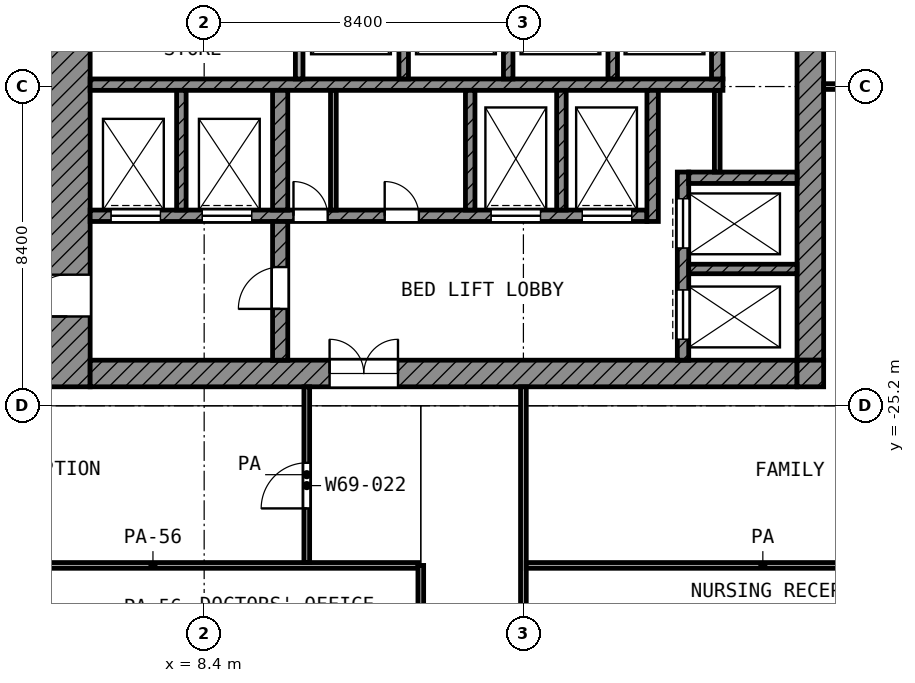
"""IFC4 building model, lengths in metres.
Left out: names, types, materials, properties, quantities, classifications, styles, units other than length and angle.
Written with IfcOpenShell. Run it as: python <this file> out.ifc"""

import sys

from ifc_helpers import new_model, si_unit, direction, frame, frame_2d, origin, place, context, subcontext, project, spatial, rectangle, extrude, element, fill, save


model = new_model("IFC4")
c1 = context("Model", 3, precision=1e-05, world=origin(), true_north=direction((0.0, 1.0)))
c2 = subcontext(c1, "Body", "Model", "MODEL_VIEW")
j1 = project(units=[si_unit("LENGTHUNIT", "METRE"), si_unit("PLANEANGLEUNIT", "RADIAN")], contexts=[c1])
p1 = place(None, origin())
s1 = spatial("IfcSite", under=j1, at=p1, CompositionType="ELEMENT")
p2 = place(p1, origin())
s2 = spatial("IfcBuilding", under=s1, at=p2, CompositionType="ELEMENT")
p3 = place(p2, frame((0.0, 0.0, 298.6)))
s3 = spatial("IfcBuildingStorey", under=s2, at=p3, CompositionType="ELEMENT", Elevation=298.6)
p4 = place(p3, frame((4.8, -24.7, 0.0), z_axis=(0.0, 0.0, 1.0), x_axis=(0.0, 1.0, 0.0)))
e1 = element("IfcWall", 1, at=p4, inside=s3, PredefinedType="SHEAR", context=c2, shape_type="SweptSolid", body=[
    extrude(rectangle(XDim=19.3, YDim=1.2, at=frame_2d((9.65, 0.0))), origin(), (0.0, 0.0, 1.0), 3.6),
])
p5 = place(p4, frame((11.15, 0.0, 0.0)))
e2 = element("IfcOpeningElement", 2, at=p5, cuts=e1, PredefinedType="OPENING", context=c2, shape_type="SweptSolid", body=[
    extrude(rectangle(XDim=1.1, YDim=2.1, at=frame_2d((0.55, 1.05))), frame((0.0, 0.61, 0.0), z_axis=(0.0, -1.0, 0.0), x_axis=(1.0, 0.0, 0.0)), (0.0, 0.0, 1.0), 1.22),
])
p6 = place(p4, frame((1.85, 0.0, 0.0)))
e3 = element("IfcOpeningElement", 3, at=p6, cuts=e1, PredefinedType="OPENING", context=c2, shape_type="SweptSolid", body=[
    extrude(rectangle(XDim=1.1, YDim=2.1, at=frame_2d((0.55, 1.05))), frame((0.0, 0.61, 0.0), z_axis=(0.0, -1.0, 0.0), x_axis=(1.0, 0.0, 0.0)), (0.0, 0.0, 1.0), 1.22),
])
p7 = place(p3, frame((24.35, -24.0, 0.0), z_axis=(0.0, 0.0, 1.0), x_axis=(0.0, 1.0, 0.0)))
e4 = element("IfcWall", 4, at=p7, inside=s3, PredefinedType="SHEAR", context=c2, shape_type="SweptSolid", body=[
    extrude(rectangle(XDim=18.6, YDim=0.7, at=frame_2d((9.3, 0.0))), origin(), (0.0, 0.0, 1.0), 3.6),
])
p8 = place(p7, frame((10.5, 0.0, 0.0)))
e5 = element("IfcOpeningElement", 5, at=p8, cuts=e4, PredefinedType="OPENING", context=c2, shape_type="SweptSolid", body=[
    extrude(rectangle(XDim=1.8, YDim=2.1, at=frame_2d((0.9, 1.05))), frame((0.0, 0.36, 0.0), z_axis=(0.0, -1.0, 0.0), x_axis=(1.0, 0.0, 0.0)), (0.0, 0.0, 1.0), 0.72),
])
p9 = place(p3, frame((5.4, -24.35, 0.0), z_axis=(0.0, 0.0, 1.0), x_axis=(1.0, 0.0, 0.0)))
e6 = element("IfcWall", 6, at=p9, inside=s3, PredefinedType="SHEAR", context=c2, shape_type="SweptSolid", body=[
    extrude(rectangle(XDim=18.6, YDim=0.7, at=frame_2d((9.3, 0.0))), origin(), (0.0, 0.0, 1.0), 3.6),
])
p10 = place(p9, frame((6.3, 0.0, 0.0)))
e7 = element("IfcOpeningElement", 7, at=p10, cuts=e6, PredefinedType="OPENING", context=c2, shape_type="SweptSolid", body=[
    extrude(rectangle(XDim=1.8, YDim=2.1, at=frame_2d((0.9, 1.05))), frame((0.0, 0.36, 0.0), z_axis=(0.0, -1.0, 0.0), x_axis=(1.0, 0.0, 0.0)), (0.0, 0.0, 1.0), 0.72),
])
p11 = place(p3, frame((24.35, -24.7, 0.0), z_axis=(0.0, 0.0, 1.0), x_axis=(0.0, 1.0, 0.0)))
e8 = element("IfcWall", 8, at=p11, inside=s3, PredefinedType="SHEAR", context=c2, shape_type="SweptSolid", body=[
    extrude(rectangle(XDim=0.7, YDim=0.7, at=frame_2d((0.35, 0.0))), origin(), (0.0, 0.0, 1.0), 3.6),
])
p12 = place(p3, frame((5.4, -16.75, 0.0), z_axis=(0.0, 0.0, 1.0), x_axis=(1.0, 0.0, 0.0)))
e9 = element("IfcWall", 9, at=p12, inside=s3, PredefinedType="SHEAR", context=c2, shape_type="SweptSolid", body=[
    extrude(rectangle(XDim=16.65, YDim=0.3, at=frame_2d((8.325, 0.0))), origin(), (0.0, 0.0, 1.0), 3.6),
])
p13 = place(p3, frame((5.4, -20.2, 0.0), z_axis=(0.0, 0.0, 1.0), x_axis=(1.0, 0.0, 0.0)))
e10 = element("IfcWall", 10, at=p13, inside=s3, PredefinedType="SHEAR", context=c2, shape_type="SweptSolid", body=[
    extrude(rectangle(XDim=14.65, YDim=0.3, at=frame_2d((7.325, 0.0))), origin(), (0.0, 0.0, 1.0), 3.6),
])
p14 = place(p13, frame((10.55, 0.0, 0.0)))
e11 = element("IfcOpeningElement", 11, at=p14, cuts=e10, PredefinedType="OPENING", context=c2, shape_type="SweptSolid", body=[
    extrude(rectangle(XDim=1.3, YDim=2.1, at=frame_2d((0.65, 1.05))), frame((0.0, 0.16, 0.0), z_axis=(0.0, -1.0, 0.0), x_axis=(1.0, 0.0, 0.0)), (0.0, 0.0, 1.0), 0.32),
])
p15 = place(p13, frame((12.95, 0.0, 0.0)))
e12 = element("IfcOpeningElement", 12, at=p15, cuts=e10, PredefinedType="OPENING", context=c2, shape_type="SweptSolid", body=[
    extrude(rectangle(XDim=1.3, YDim=2.1, at=frame_2d((0.65, 1.05))), frame((0.0, 0.16, 0.0), z_axis=(0.0, -1.0, 0.0), x_axis=(1.0, 0.0, 0.0)), (0.0, 0.0, 1.0), 0.32),
])
p16 = place(p13, frame((0.55, 0.0, 0.0)))
e13 = element("IfcOpeningElement", 13, at=p16, cuts=e10, PredefinedType="OPENING", context=c2, shape_type="SweptSolid", body=[
    extrude(rectangle(XDim=1.3, YDim=2.1, at=frame_2d((0.65, 1.05))), frame((0.0, 0.16, 0.0), z_axis=(0.0, -1.0, 0.0), x_axis=(1.0, 0.0, 0.0)), (0.0, 0.0, 1.0), 0.32),
])
p17 = place(p13, frame((2.95, 0.0, 0.0)))
e14 = element("IfcOpeningElement", 14, at=p17, cuts=e10, PredefinedType="OPENING", context=c2, shape_type="SweptSolid", body=[
    extrude(rectangle(XDim=1.3, YDim=2.1, at=frame_2d((0.65, 1.05))), frame((0.0, 0.16, 0.0), z_axis=(0.0, -1.0, 0.0), x_axis=(1.0, 0.0, 0.0)), (0.0, 0.0, 1.0), 0.32),
])
p18 = place(p13, frame((5.35, 0.0, 0.0)))
e15 = element("IfcOpeningElement", 15, at=p18, cuts=e10, PredefinedType="OPENING", context=c2, shape_type="SweptSolid", body=[
    extrude(rectangle(XDim=0.9, YDim=2.1, at=frame_2d((0.45, 1.05))), frame((0.0, 0.16, 0.0), z_axis=(0.0, -1.0, 0.0), x_axis=(1.0, 0.0, 0.0)), (0.0, 0.0, 1.0), 0.32),
])
p19 = place(p13, frame((7.75, 0.0, 0.0)))
e16 = element("IfcOpeningElement", 16, at=p19, cuts=e10, PredefinedType="OPENING", context=c2, shape_type="SweptSolid", body=[
    extrude(rectangle(XDim=0.9, YDim=2.1, at=frame_2d((0.45, 1.05))), frame((0.0, 0.16, 0.0), z_axis=(0.0, -1.0, 0.0), x_axis=(1.0, 0.0, 0.0)), (0.0, 0.0, 1.0), 0.32),
])
p20 = place(p3, frame((10.4, -24.0, 0.0), z_axis=(0.0, 0.0, 1.0), x_axis=(0.0, 1.0, 0.0)))
e17 = element("IfcWall", 17, at=p20, inside=s3, PredefinedType="SHEAR", context=c2, shape_type="SweptSolid", body=[
    extrude(rectangle(XDim=3.65, YDim=0.4, at=frame_2d((1.825, 0.0))), origin(), (0.0, 0.0, 1.0), 3.6),
])
p21 = place(p20, frame((1.35, 0.0, 0.0)))
e18 = element("IfcOpeningElement", 18, at=p21, cuts=e17, PredefinedType="OPENING", context=c2, shape_type="SweptSolid", body=[
    extrude(rectangle(XDim=1.1, YDim=2.1, at=frame_2d((0.55, 1.05))), frame((0.0, 0.21, 0.0), z_axis=(0.0, -1.0, 0.0), x_axis=(1.0, 0.0, 0.0)), (0.0, 0.0, 1.0), 0.42),
])
p22 = place(p3, frame((10.4, -20.05, 0.0), z_axis=(0.0, 0.0, 1.0), x_axis=(0.0, 1.0, 0.0)))
e19 = element("IfcWall", 19, at=p22, inside=s3, PredefinedType="SHEAR", context=c2, shape_type="SweptSolid", body=[
    extrude(rectangle(XDim=3.15, YDim=0.4, at=frame_2d((1.575, 0.0))), origin(), (0.0, 0.0, 1.0), 3.6),
])
p23 = place(p3, frame((20.2, -20.35, 0.0), z_axis=(0.0, 0.0, 1.0), x_axis=(0.0, 1.0, 0.0)))
e20 = element("IfcWall", 20, at=p23, inside=s3, PredefinedType="SHEAR", context=c2, shape_type="SweptSolid", body=[
    extrude(rectangle(XDim=3.45, YDim=0.3, at=frame_2d((1.725, 0.0))), origin(), (0.0, 0.0, 1.0), 3.6),
])
p24 = place(p3, frame((21.9, -16.6, 0.0), z_axis=(0.0, 0.0, 1.0), x_axis=(0.0, 1.0, 0.0)))
e21 = element("IfcWall", 21, at=p24, inside=s3, PredefinedType="SHEAR", context=c2, shape_type="SweptSolid", body=[
    extrude(rectangle(XDim=2.35, YDim=0.3, at=frame_2d((1.175, 0.0))), origin(), (0.0, 0.0, 1.0), 3.6),
])
p25 = place(p3, frame((21.15, -19.2, 0.0), z_axis=(0.0, 0.0, 1.0), x_axis=(1.0, 0.0, 0.0)))
e22 = element("IfcWall", 22, at=p25, inside=s3, PredefinedType="SHEAR", context=c2, shape_type="SweptSolid", body=[
    extrude(rectangle(XDim=2.85, YDim=0.3, at=frame_2d((1.425, 0.0))), origin(), (0.0, 0.0, 1.0), 3.6),
])
p26 = place(p3, frame((21.0, -24.0, 0.0), z_axis=(0.0, 0.0, 1.0), x_axis=(0.0, 1.0, 0.0)))
e23 = element("IfcWall", 23, at=p26, inside=s3, PredefinedType="SHEAR", context=c2, shape_type="SweptSolid", body=[
    extrude(rectangle(XDim=4.95, YDim=0.3, at=frame_2d((2.475, 0.0))), origin(), (0.0, 0.0, 1.0), 3.6),
])
p27 = place(p26, frame((2.95, 0.0, 0.0)))
e24 = element("IfcOpeningElement", 24, at=p27, cuts=e23, PredefinedType="OPENING", context=c2, shape_type="SweptSolid", body=[
    extrude(rectangle(XDim=1.3, YDim=2.1, at=frame_2d((0.65, 1.05))), frame((0.0, 0.16, 0.0), z_axis=(0.0, -1.0, 0.0), x_axis=(1.0, 0.0, 0.0)), (0.0, 0.0, 1.0), 0.32),
])
p28 = place(p26, frame((0.55, 0.0, 0.0)))
e25 = element("IfcOpeningElement", 25, at=p28, cuts=e23, PredefinedType="OPENING", context=c2, shape_type="SweptSolid", body=[
    extrude(rectangle(XDim=1.3, YDim=2.1, at=frame_2d((0.65, 1.05))), frame((0.0, 0.16, 0.0), z_axis=(0.0, -1.0, 0.0), x_axis=(1.0, 0.0, 0.0)), (0.0, 0.0, 1.0), 0.32),
])
p29 = place(p3, frame((21.15, -21.6, 0.0), z_axis=(0.0, 0.0, 1.0), x_axis=(1.0, 0.0, 0.0)))
e26 = element("IfcWall", 26, at=p29, inside=s3, PredefinedType="SHEAR", context=c2, shape_type="SweptSolid", body=[
    extrude(rectangle(XDim=2.85, YDim=0.25, at=frame_2d((1.425, 0.0))), origin(), (0.0, 0.0, 1.0), 3.6),
])
for number, where, z_axis, x_axis in (
    (27, (7.8, -20.05, 0.0), (0.0, 0.0, 1.0), (0.0, 1.0, 0.0)),
    (28, (15.4, -20.05, 0.0), (0.0, 0.0, 1.0), (0.0, 1.0, 0.0)),
    (29, (17.8, -20.05, 0.0), (0.0, 0.0, 1.0), (0.0, 1.0, 0.0)),
):
    element("IfcWall", number, at=place(p3, frame(where, z_axis=z_axis, x_axis=x_axis)), inside=s3, PredefinedType="SHEAR", context=c2, shape_type="SweptSolid", body=[
        extrude(rectangle(XDim=3.15, YDim=0.25, at=frame_2d((1.575, 0.0))), origin(), (0.0, 0.0, 1.0), 3.6),
    ])
p30 = place(p3, frame((10.9, -16.6, 0.0), z_axis=(0.0, 0.0, 1.0), x_axis=(0.0, 1.0, 0.0)))
e30 = element("IfcWall", 30, at=p30, inside=s3, PredefinedType="PARTITIONING", context=c2, shape_type="SweptSolid", body=[
    extrude(rectangle(XDim=2.35, YDim=0.2, at=frame_2d((1.175, 0.0))), origin(), (0.0, 0.0, 1.0), 3.6),
])
for number, where, z_axis, x_axis in (
    (31, (13.65, -16.6, 0.0), (0.0, 0.0, 1.0), (0.0, 1.0, 0.0)),
    (32, (16.4, -16.6, 0.0), (0.0, 0.0, 1.0), (0.0, 1.0, 0.0)),
    (33, (19.15, -16.6, 0.0), (0.0, 0.0, 1.0), (0.0, 1.0, 0.0)),
):
    element("IfcWall", number, at=place(p3, frame(where, z_axis=z_axis, x_axis=x_axis)), inside=s3, PredefinedType="SHEAR", context=c2, shape_type="SweptSolid", body=[
        extrude(rectangle(XDim=2.35, YDim=0.25, at=frame_2d((1.175, 0.0))), origin(), (0.0, 0.0, 1.0), 3.6),
    ])
p31 = place(p3, frame((21.9, -19.05, 0.0), z_axis=(0.0, 0.0, 1.0), x_axis=(0.0, 1.0, 0.0)))
e34 = element("IfcWall", 34, at=p31, inside=s3, PredefinedType="PARTITIONING", context=c2, shape_type="SweptSolid", body=[
    extrude(rectangle(XDim=2.15, YDim=0.15, at=frame_2d((1.075, 0.0))), origin(), (0.0, 0.0, 1.0), 3.6),
])
p32 = place(p3, frame((11.8, -20.05, 0.0), z_axis=(0.0, 0.0, 1.0), x_axis=(0.0, 1.0, 0.0)))
e35 = element("IfcWall", 35, at=p32, inside=s3, PredefinedType="PARTITIONING", context=c2, shape_type="SweptSolid", body=[
    extrude(rectangle(XDim=3.15, YDim=0.15, at=frame_2d((1.575, 0.0))), origin(), (0.0, 0.0, 1.0), 3.6),
])
p33 = place(p3, frame((0.08, -29.4, 0.0), z_axis=(0.0, 0.0, 1.0), x_axis=(1.0, 0.0, 0.0)))
e36 = element("IfcWall", 36, at=p33, inside=s3, PredefinedType="PARTITIONING", context=c2, shape_type="SweptSolid", body=[
    extrude(rectangle(XDim=13.945, YDim=0.15, at=frame_2d((6.972, 0.0))), origin(), (0.0, 0.0, 1.0), 2.7),
])
p34 = place(p3, frame((16.875, -29.4, 0.0), z_axis=(0.0, 0.0, 1.0), x_axis=(1.0, 0.0, 0.0)))
e37 = element("IfcWall", 37, at=p34, inside=s3, PredefinedType="PARTITIONING", context=c2, shape_type="SweptSolid", body=[
    extrude(rectangle(XDim=12.45, YDim=0.15, at=frame_2d((6.225, 0.0))), origin(), (0.0, 0.0, 1.0), 3.6),
])
p35 = place(p3, frame((24.7, -16.8, 0.0), z_axis=(0.0, 0.0, 1.0), x_axis=(1.0, 0.0, 0.0)))
e38 = element("IfcWall", 38, at=p35, inside=s3, PredefinedType="PARTITIONING", context=c2, shape_type="SweptSolid", body=[
    extrude(rectangle(XDim=34.02, YDim=0.15, at=frame_2d((17.01, 0.0))), origin(), (0.0, 0.0, 1.0), 3.6),
])
p36 = place(p35, frame((1.85, 0.0, 0.0)))
e39 = element("IfcOpeningElement", 39, at=p36, cuts=e38, PredefinedType="OPENING", context=c2, shape_type="SweptSolid", body=[
    extrude(rectangle(XDim=1.5, YDim=2.1, at=frame_2d((0.75, 1.05))), frame((0.0, 0.085, 0.0), z_axis=(0.0, -1.0, 0.0), x_axis=(1.0, 0.0, 0.0)), (0.0, 0.0, 1.0), 0.17),
])
p37 = place(p35, frame((6.2, 0.0, 0.0)))
e40 = element("IfcOpeningElement", 40, at=p37, cuts=e38, PredefinedType="OPENING", context=c2, shape_type="SweptSolid", body=[
    extrude(rectangle(XDim=1.2, YDim=2.1, at=frame_2d((0.6, 1.05))), frame((0.0, 0.085, 0.0), z_axis=(0.0, -1.0, 0.0), x_axis=(1.0, 0.0, 0.0)), (0.0, 0.0, 1.0), 0.17),
])
p38 = place(p35, frame((10.35, 0.0, 0.0)))
e41 = element("IfcOpeningElement", 41, at=p38, cuts=e38, PredefinedType="OPENING", context=c2, shape_type="SweptSolid", body=[
    extrude(rectangle(XDim=1.0, YDim=2.1, at=frame_2d((0.5, 1.05))), frame((0.0, 0.085, 0.0), z_axis=(0.0, -1.0, 0.0), x_axis=(1.0, 0.0, 0.0)), (0.0, 0.0, 1.0), 0.17),
])
p39 = place(p35, frame((20.0, 0.0, 0.0)))
e42 = element("IfcOpeningElement", 42, at=p39, cuts=e38, PredefinedType="OPENING", context=c2, shape_type="SweptSolid", body=[
    extrude(rectangle(XDim=1.2, YDim=2.1, at=frame_2d((0.6, 1.05))), frame((0.0, 0.085, 0.0), z_axis=(0.0, -1.0, 0.0), x_axis=(1.0, 0.0, 0.0)), (0.0, 0.0, 1.0), 0.17),
])
p40 = place(p35, frame((18.4, 0.0, 0.0)))
e43 = element("IfcOpeningElement", 43, at=p40, cuts=e38, PredefinedType="OPENING", context=c2, shape_type="SweptSolid", body=[
    extrude(rectangle(XDim=1.2, YDim=2.1, at=frame_2d((0.6, 1.05))), frame((0.0, 0.085, 0.0), z_axis=(0.0, -1.0, 0.0), x_axis=(1.0, 0.0, 0.0)), (0.0, 0.0, 1.0), 0.17),
])
p41 = place(p35, frame((23.1, 0.0, 0.0)))
e44 = element("IfcOpeningElement", 44, at=p41, cuts=e38, PredefinedType="OPENING", context=c2, shape_type="SweptSolid", body=[
    extrude(rectangle(XDim=1.0, YDim=2.1, at=frame_2d((0.5, 1.05))), frame((0.0, 0.085, 0.0), z_axis=(0.0, -1.0, 0.0), x_axis=(1.0, 0.0, 0.0)), (0.0, 0.0, 1.0), 0.17),
])
p42 = place(p35, frame((29.15, 0.0, 0.0)))
e45 = element("IfcOpeningElement", 45, at=p42, cuts=e38, PredefinedType="OPENING", context=c2, shape_type="SweptSolid", body=[
    extrude(rectangle(XDim=1.5, YDim=2.1, at=frame_2d((0.75, 1.05))), frame((0.0, 0.085, 0.0), z_axis=(0.0, -1.0, 0.0), x_axis=(1.0, 0.0, 0.0)), (0.0, 0.0, 1.0), 0.17),
])
p43 = place(p3, frame((11.1, -29.325, 0.0), z_axis=(0.0, 0.0, 1.0), x_axis=(0.0, 1.0, 0.0)))
e46 = element("IfcWall", 46, at=p43, inside=s3, PredefinedType="PARTITIONING", context=c2, shape_type="SweptSolid", body=[
    extrude(rectangle(XDim=4.625, YDim=0.15, at=frame_2d((2.312, 0.0))), origin(), (0.0, 0.0, 1.0), 3.6),
])
p44 = place(p43, frame((1.425, 0.0, 0.0)))
e47 = element("IfcOpeningElement", 47, at=p44, cuts=e46, PredefinedType="OPENING", context=c2, shape_type="SweptSolid", body=[
    extrude(rectangle(XDim=1.2, YDim=2.1, at=frame_2d((0.6, 1.05))), frame((0.0, 0.085, 0.0), z_axis=(0.0, -1.0, 0.0), x_axis=(1.0, 0.0, 0.0)), (0.0, 0.0, 1.0), 0.17),
])
p45 = place(p3, frame((14.1, -31.957, 0.0), z_axis=(0.0, 0.0, 1.0), x_axis=(0.0, 1.0, 0.0)))
e48 = element("IfcWall", 48, at=p45, inside=s3, PredefinedType="PARTITIONING", context=c2, shape_type="SweptSolid", body=[
    extrude(rectangle(XDim=2.557, YDim=0.15, at=frame_2d((1.279, 0.0))), origin(), (0.0, 0.0, 1.0), 3.6),
])
p46 = place(p3, frame((16.8, -41.92, 0.0), z_axis=(0.0, 0.0, 1.0), x_axis=(0.0, 1.0, 0.0)))
e49 = element("IfcWall", 49, at=p46, inside=s3, PredefinedType="PARTITIONING", context=c2, shape_type="SweptSolid", body=[
    extrude(rectangle(XDim=17.22, YDim=0.15, at=frame_2d((8.61, 0.0))), origin(), (0.0, 0.0, 1.0), 3.6),
])
p47 = place(p46, frame((9.82, 0.0, 0.0)))
e50 = element("IfcOpeningElement", 50, at=p47, cuts=e49, PredefinedType="OPENING", context=c2, shape_type="SweptSolid", body=[
    extrude(rectangle(XDim=1.2, YDim=2.1, at=frame_2d((0.6, 1.05))), frame((0.0, 0.085, 0.0), z_axis=(0.0, -1.0, 0.0), x_axis=(1.0, 0.0, 0.0)), (0.0, 0.0, 1.0), 0.17),
])
p48 = place(p46, frame((5.87, 0.0, 0.0)))
e51 = element("IfcOpeningElement", 51, at=p48, cuts=e49, PredefinedType="OPENING", context=c2, shape_type="SweptSolid", body=[
    extrude(rectangle(XDim=1.0, YDim=2.1, at=frame_2d((0.5, 1.05))), frame((0.0, 0.085, 0.0), z_axis=(0.0, -1.0, 0.0), x_axis=(1.0, 0.0, 0.0)), (0.0, 0.0, 1.0), 0.17),
])
p49 = place(p46, frame((1.67, 0.0, 0.0)))
e52 = element("IfcOpeningElement", 52, at=p49, cuts=e49, PredefinedType="OPENING", context=c2, shape_type="SweptSolid", body=[
    extrude(rectangle(XDim=1.0, YDim=2.1, at=frame_2d((0.5, 1.05))), frame((0.0, 0.085, 0.0), z_axis=(0.0, -1.0, 0.0), x_axis=(1.0, 0.0, 0.0)), (0.0, 0.0, 1.0), 0.17),
])
p50 = place(p27, origin())
e53 = element("IfcDoor", 53, at=p50, inside=s3, OperationType="DOUBLE_DOOR_SLIDING", PredefinedType="DOOR", context=c2, shape_type="SweptSolid", body=[
    extrude(rectangle(XDim=1.3, YDim=2.1, at=frame_2d((0.65, 1.05))), frame((0.0, 0.025, 0.0), z_axis=(0.0, -1.0, 0.0), x_axis=(1.0, 0.0, 0.0)), (0.0, 0.0, 1.0), 0.05),
])
fill(e24, e53)
p51 = place(p28, origin())
e54 = element("IfcDoor", 54, at=p51, inside=s3, OperationType="DOUBLE_DOOR_SLIDING", PredefinedType="DOOR", context=c2, shape_type="SweptSolid", body=[
    extrude(rectangle(XDim=1.3, YDim=2.1, at=frame_2d((0.65, 1.05))), frame((0.0, 0.025, 0.0), z_axis=(0.0, -1.0, 0.0), x_axis=(1.0, 0.0, 0.0)), (0.0, 0.0, 1.0), 0.05),
])
fill(e25, e54)
p52 = place(p14, origin())
e55 = element("IfcDoor", 55, at=p52, inside=s3, OperationType="DOUBLE_DOOR_SLIDING", PredefinedType="DOOR", context=c2, shape_type="SweptSolid", body=[
    extrude(rectangle(XDim=1.3, YDim=2.1, at=frame_2d((0.65, 1.05))), frame((0.0, 0.025, 0.0), z_axis=(0.0, -1.0, 0.0), x_axis=(1.0, 0.0, 0.0)), (0.0, 0.0, 1.0), 0.05),
])
fill(e11, e55)
p53 = place(p15, origin())
e56 = element("IfcDoor", 56, at=p53, inside=s3, OperationType="DOUBLE_DOOR_SLIDING", PredefinedType="DOOR", context=c2, shape_type="SweptSolid", body=[
    extrude(rectangle(XDim=1.3, YDim=2.1, at=frame_2d((0.65, 1.05))), frame((0.0, 0.025, 0.0), z_axis=(0.0, -1.0, 0.0), x_axis=(1.0, 0.0, 0.0)), (0.0, 0.0, 1.0), 0.05),
])
fill(e12, e56)
p54 = place(p16, origin())
e57 = element("IfcDoor", 57, at=p54, inside=s3, OperationType="DOUBLE_DOOR_SLIDING", PredefinedType="DOOR", context=c2, shape_type="SweptSolid", body=[
    extrude(rectangle(XDim=1.3, YDim=2.1, at=frame_2d((0.65, 1.05))), frame((0.0, 0.025, 0.0), z_axis=(0.0, -1.0, 0.0), x_axis=(1.0, 0.0, 0.0)), (0.0, 0.0, 1.0), 0.05),
])
fill(e13, e57)
p55 = place(p17, origin())
e58 = element("IfcDoor", 58, at=p55, inside=s3, OperationType="DOUBLE_DOOR_SLIDING", PredefinedType="DOOR", context=c2, shape_type="SweptSolid", body=[
    extrude(rectangle(XDim=1.3, YDim=2.1, at=frame_2d((0.65, 1.05))), frame((0.0, 0.025, 0.0), z_axis=(0.0, -1.0, 0.0), x_axis=(1.0, 0.0, 0.0)), (0.0, 0.0, 1.0), 0.05),
])
fill(e14, e58)
p56 = place(p6, origin())
e59 = element("IfcDoor", 59, at=p56, inside=s3, OperationType="SINGLE_SWING_LEFT", PredefinedType="DOOR", context=c2, shape_type="SweptSolid", body=[
    extrude(rectangle(XDim=1.1, YDim=2.1, at=frame_2d((0.55, 1.05))), frame((0.0, 0.025, 0.0), z_axis=(0.0, -1.0, 0.0), x_axis=(1.0, 0.0, 0.0)), (0.0, 0.0, 1.0), 0.05),
])
fill(e3, e59)
p57 = place(p21, origin())
e60 = element("IfcDoor", 60, at=p57, inside=s3, OperationType="SINGLE_SWING_LEFT", PredefinedType="DOOR", context=c2, shape_type="SweptSolid", body=[
    extrude(rectangle(XDim=1.1, YDim=2.1, at=frame_2d((0.55, 1.05))), frame((0.0, 0.025, 0.0), z_axis=(0.0, -1.0, 0.0), x_axis=(1.0, 0.0, 0.0)), (0.0, 0.0, 1.0), 0.05),
])
fill(e18, e60)
p58 = place(p10, origin())
e61 = element("IfcDoor", 61, at=p58, inside=s3, OperationType="DOUBLE_DOOR_SINGLE_SWING", PredefinedType="DOOR", context=c2, shape_type="SweptSolid", body=[
    extrude(rectangle(XDim=1.8, YDim=2.1, at=frame_2d((0.9, 1.05))), frame((0.0, 0.025, 0.0), z_axis=(0.0, -1.0, 0.0), x_axis=(1.0, 0.0, 0.0)), (0.0, 0.0, 1.0), 0.05),
])
fill(e7, e61)
p59 = place(p18, origin())
e62 = element("IfcDoor", 62, at=p59, inside=s3, OperationType="SINGLE_SWING_LEFT", PredefinedType="DOOR", context=c2, shape_type="SweptSolid", body=[
    extrude(rectangle(XDim=0.9, YDim=2.1, at=frame_2d((0.45, 1.05))), frame((0.0, 0.025, 0.0), z_axis=(0.0, -1.0, 0.0), x_axis=(1.0, 0.0, 0.0)), (0.0, 0.0, 1.0), 0.05),
])
fill(e15, e62)
p60 = place(p19, origin())
e63 = element("IfcDoor", 63, at=p60, inside=s3, OperationType="SINGLE_SWING_LEFT", PredefinedType="DOOR", context=c2, shape_type="SweptSolid", body=[
    extrude(rectangle(XDim=0.9, YDim=2.1, at=frame_2d((0.45, 1.05))), frame((0.0, 0.025, 0.0), z_axis=(0.0, -1.0, 0.0), x_axis=(1.0, 0.0, 0.0)), (0.0, 0.0, 1.0), 0.05),
])
fill(e16, e63)
p61 = place(p44, origin())
e64 = element("IfcDoor", 64, at=p61, inside=s3, OperationType="SINGLE_SWING_LEFT", PredefinedType="DOOR", context=c2, shape_type="SweptSolid", body=[
    extrude(rectangle(XDim=1.2, YDim=2.1, at=frame_2d((0.6, 1.05))), frame((0.0, 0.025, 0.0), z_axis=(0.0, -1.0, 0.0), x_axis=(1.0, 0.0, 0.0)), (0.0, 0.0, 1.0), 0.05),
])
fill(e47, e64)
save(model, sys.argv[1])
